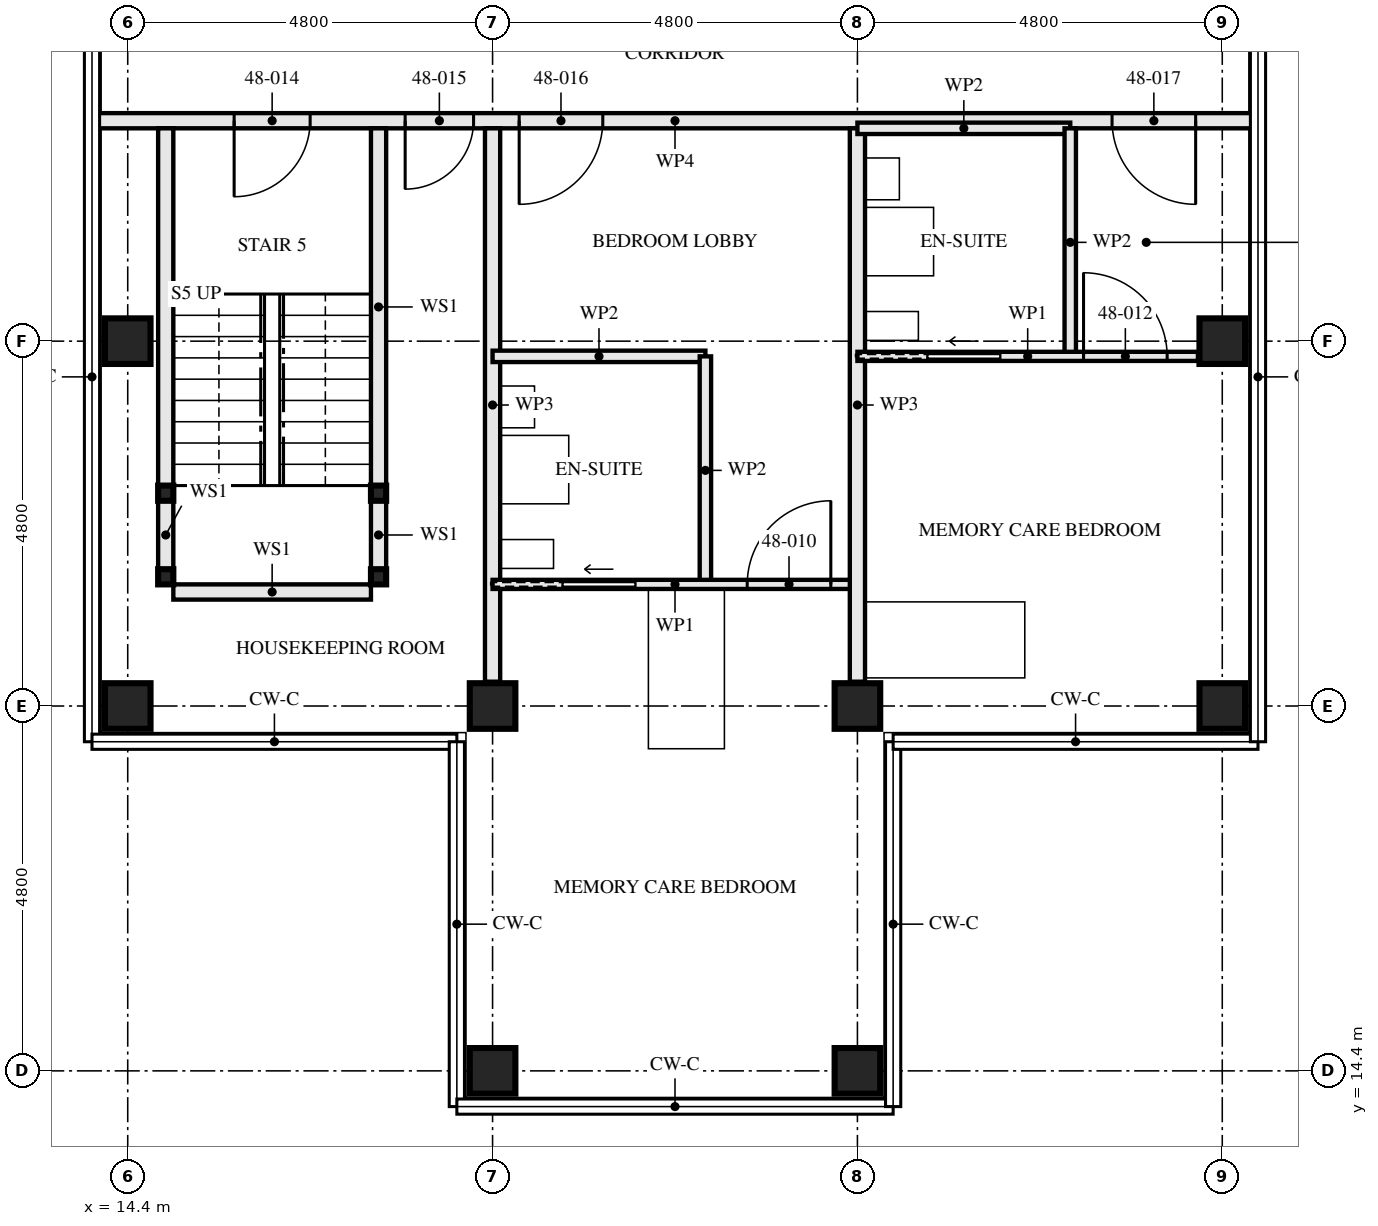
"""IFC4 building model, lengths in metres.
Left out: names, types, materials, properties, quantities, classifications, styles, units other than length and angle.
Written with IfcOpenShell. Run it as: python <this file> out.ifc"""

import sys

from ifc_helpers import new_model, si_unit, direction, frame, frame_2d, origin, origin_2d, place, context, subcontext, project, spatial, rectangle, hollow_rectangle, extrude, element, fill, save


model = new_model("IFC4")
c1 = context("Model", 3, precision=1e-05, world=origin(), true_north=direction((0.0, 1.0)))
c2 = subcontext(c1, "Body", "Model", "MODEL_VIEW")
j1 = project(units=[si_unit("LENGTHUNIT", "METRE"), si_unit("PLANEANGLEUNIT", "RADIAN")], contexts=[c1])
p1 = place(None, origin())
s1 = spatial("IfcSite", under=j1, at=p1, CompositionType="ELEMENT")
p2 = place(p1, origin())
s2 = spatial("IfcBuilding", under=s1, at=p2, CompositionType="ELEMENT")
p3 = place(p2, frame((0.0, 0.0, 176.0)))
s3 = spatial("IfcBuildingStorey", under=s2, at=p3, CompositionType="ELEMENT", Elevation=176.0)
for number, where, z_axis, x_axis in (
    (1, (14.4, 19.2, 0.0), (0.0, 0.0, 1.0), (0.0, 1.0, 0.0)),
    (2, (14.4, 24.0, 0.0), (0.0, 0.0, 1.0), (1.0, 0.0, 0.0)),
    (3, (19.2, 14.4, 0.0), (0.0, 0.0, 1.0), (0.0, 1.0, 0.0)),
    (4, (19.2, 19.2, 0.0), (0.0, 0.0, 1.0), (0.0, 1.0, 0.0)),
    (5, (24.0, 14.4, 0.0), (0.0, 0.0, 1.0), (0.0, 1.0, 0.0)),
    (6, (24.0, 19.2, 0.0), (0.0, 0.0, 1.0), (0.0, 1.0, 0.0)),
    (7, (28.8, 19.2, 0.0), (0.0, 0.0, 1.0), (0.0, 1.0, 0.0)),
    (8, (28.8, 24.0, 0.0), (0.0, 0.0, 1.0), (1.0, 0.0, 0.0)),
):
    element("IfcColumn", number, at=place(p3, frame(where, z_axis=z_axis, x_axis=x_axis)), inside=s3, PredefinedType="COLUMN", context=c2, shape_type="SweptSolid", body=[
        extrude(hollow_rectangle(XDim=0.6, YDim=0.6, WallThickness=0.08, at=origin_2d()), origin(), (0.0, 0.0, 1.0), 3.5),
    ])
for number, where, z_axis, x_axis in (
    (9, (14.9, 20.9, 0.0), (0.0, 0.0, 1.0), (1.0, 0.0, 0.0)),
    (10, (17.7, 20.9, 0.0), (0.0, 0.0, 1.0), (1.0, 0.0, 0.0)),
    (11, (14.9, 22.0, 0.0), (0.0, 0.0, 1.0), (1.0, 0.0, 0.0)),
    (12, (17.7, 22.0, 0.0), (0.0, 0.0, 1.0), (1.0, 0.0, 0.0)),
):
    element("IfcColumn", number, at=place(p3, frame(where, z_axis=z_axis, x_axis=x_axis)), inside=s3, PredefinedType="COLUMN", context=c2, shape_type="SweptSolid", body=[
        extrude(hollow_rectangle(XDim=0.2, YDim=0.2, WallThickness=0.008, at=origin_2d()), origin(), (0.0, 0.0, 1.0), 3.33),
    ])
p4 = place(p3, frame((14.9, 21.0, 0.0), z_axis=(0.0, 0.0, 1.0), x_axis=(0.0, 1.0, 0.0)))
e13 = element("IfcWall", 13, at=p4, inside=s3, PredefinedType="SOLIDWALL", context=c2, shape_type="SweptSolid", body=[
    extrude(rectangle(XDim=0.9, YDim=0.2, at=frame_2d((0.45, 0.0))), origin(), (0.0, 0.0, 1.0), 2.99),
])
p5 = place(p3, frame((14.9, 22.1, 0.0), z_axis=(0.0, 0.0, 1.0), x_axis=(0.0, 1.0, 0.0)))
e14 = element("IfcWall", 14, at=p5, inside=s3, PredefinedType="SOLIDWALL", context=c2, shape_type="SweptSolid", body=[
    extrude(rectangle(XDim=4.7, YDim=0.2, at=frame_2d((2.35, 0.0))), origin(), (0.0, 0.0, 1.0), 2.99),
])
p6 = place(p3, frame((17.7, 21.0, 0.0), z_axis=(0.0, 0.0, 1.0), x_axis=(0.0, 1.0, 0.0)))
e15 = element("IfcWall", 15, at=p6, inside=s3, PredefinedType="SOLIDWALL", context=c2, shape_type="SweptSolid", body=[
    extrude(rectangle(XDim=0.9, YDim=0.2, at=frame_2d((0.45, 0.0))), origin(), (0.0, 0.0, 1.0), 2.99),
])
p7 = place(p3, frame((17.7, 22.1, 0.0), z_axis=(0.0, 0.0, 1.0), x_axis=(0.0, 1.0, 0.0)))
e16 = element("IfcWall", 16, at=p7, inside=s3, PredefinedType="SOLIDWALL", context=c2, shape_type="SweptSolid", body=[
    extrude(rectangle(XDim=4.7, YDim=0.2, at=frame_2d((2.35, 0.0))), origin(), (0.0, 0.0, 1.0), 2.99),
])
p8 = place(p3, frame((15.0, 20.7, 0.0), z_axis=(0.0, 0.0, 1.0), x_axis=(1.0, 0.0, 0.0)))
e17 = element("IfcWall", 17, at=p8, inside=s3, PredefinedType="SOLIDWALL", context=c2, shape_type="SweptSolid", body=[
    extrude(rectangle(XDim=2.6, YDim=0.2, at=frame_2d((1.3, 0.0))), origin(), (0.0, 0.0, 1.0), 3.33),
])
p9 = place(p3, frame((19.2, 19.52, 0.0), z_axis=(0.0, 0.0, 1.0), x_axis=(0.0, 1.0, 0.0)))
e18 = element("IfcWall", 18, at=p9, inside=s3, PredefinedType="PARTITIONING", context=c2, shape_type="SweptSolid", body=[
    extrude(rectangle(XDim=7.28, YDim=0.2, at=frame_2d((3.64, 0.0))), origin(), (0.0, 0.0, 1.0), 2.55),
])
p10 = place(p3, frame((22.0, 20.8, 0.0), z_axis=(0.0, 0.0, 1.0), x_axis=(0.0, 1.0, 0.0)))
e19 = element("IfcWall", 19, at=p10, inside=s3, PredefinedType="PARTITIONING", context=c2, shape_type="SweptSolid", body=[
    extrude(rectangle(XDim=3.0, YDim=0.15, at=frame_2d((1.5, 0.0))), origin(), (0.0, 0.0, 1.0), 3.33),
])
p11 = place(p3, frame((19.2, 23.8, 0.0), z_axis=(0.0, 0.0, 1.0), x_axis=(1.0, 0.0, 0.0)))
e20 = element("IfcWall", 20, at=p11, inside=s3, PredefinedType="PARTITIONING", context=c2, shape_type="SweptSolid", body=[
    extrude(rectangle(XDim=2.8, YDim=0.15, at=frame_2d((1.4, 0.0))), origin(), (0.0, 0.0, 1.0), 3.33),
])
p12 = place(p3, frame((19.2, 20.8, 0.0), z_axis=(0.0, 0.0, 1.0), x_axis=(1.0, 0.0, 0.0)))
e21 = element("IfcWall", 21, at=p12, inside=s3, PredefinedType="PARTITIONING", context=c2, shape_type="SweptSolid", body=[
    extrude(rectangle(XDim=4.8, YDim=0.12, at=frame_2d((2.4, 0.0))), origin(), (0.0, 0.0, 1.0), 3.33),
])
p13 = place(p12, frame((3.35, 0.0, 0.0)))
e22 = element("IfcOpeningElement", 22, at=p13, cuts=e21, PredefinedType="OPENING", context=c2, shape_type="SweptSolid", body=[
    extrude(rectangle(XDim=1.1, YDim=2.1, at=frame_2d((0.55, 1.05))), frame((0.0, 0.071, 0.0), z_axis=(0.0, -1.0, 0.0), x_axis=(1.0, 0.0, 0.0)), (0.0, 0.0, 1.0), 0.141),
])
p14 = place(p12, frame((0.925, 0.0, 0.0)))
e23 = element("IfcOpeningElement", 23, at=p14, cuts=e21, PredefinedType="OPENING", context=c2, shape_type="SweptSolid", body=[
    extrude(rectangle(XDim=0.95, YDim=2.1, at=frame_2d((0.475, 1.05))), frame((0.0, 0.071, 0.0), z_axis=(0.0, -1.0, 0.0), x_axis=(1.0, 0.0, 0.0)), (0.0, 0.0, 1.0), 0.141),
])
p15 = place(p3, frame((24.0, 19.52, 0.0), z_axis=(0.0, 0.0, 1.0), x_axis=(0.0, 1.0, 0.0)))
e24 = element("IfcWall", 24, at=p15, inside=s3, PredefinedType="PARTITIONING", context=c2, shape_type="SweptSolid", body=[
    extrude(rectangle(XDim=7.28, YDim=0.2, at=frame_2d((3.64, 0.0))), origin(), (0.0, 0.0, 1.0), 2.55),
])
p16 = place(p3, frame((26.8, 23.8, 0.0), z_axis=(0.0, 0.0, 1.0), x_axis=(0.0, 1.0, 0.0)))
e25 = element("IfcWall", 25, at=p16, inside=s3, PredefinedType="PARTITIONING", context=c2, shape_type="SweptSolid", body=[
    extrude(rectangle(XDim=3.0, YDim=0.15, at=frame_2d((1.5, 0.0))), origin(), (0.0, 0.0, 1.0), 2.55),
])
p17 = place(p3, frame((24.0, 26.8, 0.0), z_axis=(0.0, 0.0, 1.0), x_axis=(1.0, 0.0, 0.0)))
e26 = element("IfcWall", 26, at=p17, inside=s3, PredefinedType="PARTITIONING", context=c2, shape_type="SweptSolid", body=[
    extrude(rectangle(XDim=2.8, YDim=0.15, at=frame_2d((1.4, 0.0))), origin(), (0.0, 0.0, 1.0), 3.33),
])
p18 = place(p3, frame((24.0, 23.8, 0.0), z_axis=(0.0, 0.0, 1.0), x_axis=(1.0, 0.0, 0.0)))
e27 = element("IfcWall", 27, at=p18, inside=s3, PredefinedType="PARTITIONING", context=c2, shape_type="SweptSolid", body=[
    extrude(rectangle(XDim=4.48, YDim=0.12, at=frame_2d((2.24, 0.0))), origin(), (0.0, 0.0, 1.0), 3.33),
])
p19 = place(p18, frame((2.975, 0.0, 0.0)))
e28 = element("IfcOpeningElement", 28, at=p19, cuts=e27, PredefinedType="OPENING", context=c2, shape_type="SweptSolid", body=[
    extrude(rectangle(XDim=1.1, YDim=2.1, at=frame_2d((0.55, 1.05))), frame((0.0, 0.071, 0.0), z_axis=(0.0, -1.0, 0.0), x_axis=(1.0, 0.0, 0.0)), (0.0, 0.0, 1.0), 0.141),
])
p20 = place(p18, frame((0.925, 0.0, 0.0)))
e29 = element("IfcOpeningElement", 29, at=p20, cuts=e27, PredefinedType="OPENING", context=c2, shape_type="SweptSolid", body=[
    extrude(rectangle(XDim=0.95, YDim=2.1, at=frame_2d((0.475, 1.05))), frame((0.0, 0.071, 0.0), z_axis=(0.0, -1.0, 0.0), x_axis=(1.0, 0.0, 0.0)), (0.0, 0.0, 1.0), 0.141),
])
p21 = place(p3, frame((13.95, 26.9, 0.0), z_axis=(0.0, 0.0, 1.0), x_axis=(1.0, 0.0, 0.0)))
e30 = element("IfcWall", 30, at=p21, inside=s3, PredefinedType="PARTITIONING", context=c2, shape_type="SweptSolid", body=[
    extrude(rectangle(XDim=15.3, YDim=0.2, at=frame_2d((7.65, 0.0))), origin(), (0.0, 0.0, 1.0), 2.32),
])
p22 = place(p21, frame((1.85, 0.0, 0.0)))
e31 = element("IfcOpeningElement", 31, at=p22, cuts=e30, PredefinedType="OPENING", context=c2, shape_type="SweptSolid", body=[
    extrude(rectangle(XDim=1.0, YDim=2.1, at=frame_2d((0.5, 1.05))), frame((0.0, 0.111, 0.0), z_axis=(0.0, -1.0, 0.0), x_axis=(1.0, 0.0, 0.0)), (0.0, 0.0, 1.0), 0.221),
])
p23 = place(p21, frame((4.1, 0.0, 0.0)))
e32 = element("IfcOpeningElement", 32, at=p23, cuts=e30, PredefinedType="OPENING", context=c2, shape_type="SweptSolid", body=[
    extrude(rectangle(XDim=0.9, YDim=2.1, at=frame_2d((0.45, 1.05))), frame((0.0, 0.111, 0.0), z_axis=(0.0, -1.0, 0.0), x_axis=(1.0, 0.0, 0.0)), (0.0, 0.0, 1.0), 0.221),
])
p24 = place(p21, frame((5.6, 0.0, 0.0)))
e33 = element("IfcOpeningElement", 33, at=p24, cuts=e30, PredefinedType="OPENING", context=c2, shape_type="SweptSolid", body=[
    extrude(rectangle(XDim=1.1, YDim=2.1, at=frame_2d((0.55, 1.05))), frame((0.0, 0.111, 0.0), z_axis=(0.0, -1.0, 0.0), x_axis=(1.0, 0.0, 0.0)), (0.0, 0.0, 1.0), 0.221),
])
p25 = place(p21, frame((13.4, 0.0, 0.0)))
e34 = element("IfcOpeningElement", 34, at=p25, cuts=e30, PredefinedType="OPENING", context=c2, shape_type="SweptSolid", body=[
    extrude(rectangle(XDim=1.1, YDim=2.1, at=frame_2d((0.55, 1.05))), frame((0.0, 0.111, 0.0), z_axis=(0.0, -1.0, 0.0), x_axis=(1.0, 0.0, 0.0)), (0.0, 0.0, 1.0), 0.221),
])
p26 = place(p13, origin())
e35 = element("IfcDoor", 35, at=p26, inside=s3, OperationType="SINGLE_SWING_LEFT", PredefinedType="DOOR", context=c2, shape_type="SweptSolid", body=[
    extrude(rectangle(XDim=1.1, YDim=2.1, at=frame_2d((0.55, 1.05))), frame((0.0, 0.022, 0.0), z_axis=(0.0, -1.0, 0.0), x_axis=(1.0, 0.0, 0.0)), (0.0, 0.0, 1.0), 0.044),
])
fill(e22, e35)
p27 = place(p14, origin())
e36 = element("IfcDoor", 36, at=p27, inside=s3, OperationType="SLIDING_TO_RIGHT", PredefinedType="DOOR", context=c2, shape_type="SweptSolid", body=[
    extrude(rectangle(XDim=0.95, YDim=2.1, at=frame_2d((0.475, 1.05))), frame((0.0, 0.022, 0.0), z_axis=(0.0, -1.0, 0.0), x_axis=(1.0, 0.0, 0.0)), (0.0, 0.0, 1.0), 0.044),
])
fill(e23, e36)
p28 = place(p19, origin())
e37 = element("IfcDoor", 37, at=p28, inside=s3, OperationType="SINGLE_SWING_RIGHT", PredefinedType="DOOR", context=c2, shape_type="SweptSolid", body=[
    extrude(rectangle(XDim=1.1, YDim=2.1, at=frame_2d((0.55, 1.05))), frame((0.0, 0.022, 0.0), z_axis=(0.0, -1.0, 0.0), x_axis=(1.0, 0.0, 0.0)), (0.0, 0.0, 1.0), 0.044),
])
fill(e28, e37)
p29 = place(p20, origin())
e38 = element("IfcDoor", 38, at=p29, inside=s3, OperationType="SLIDING_TO_RIGHT", PredefinedType="DOOR", context=c2, shape_type="SweptSolid", body=[
    extrude(rectangle(XDim=0.95, YDim=2.1, at=frame_2d((0.475, 1.05))), frame((0.0, 0.022, 0.0), z_axis=(0.0, -1.0, 0.0), x_axis=(1.0, 0.0, 0.0)), (0.0, 0.0, 1.0), 0.044),
])
fill(e29, e38)
p30 = place(p22, frame((1.0, 0.0, 0.0), z_axis=(0.0, 0.0, 1.0), x_axis=(-1.0, 0.0, 0.0)))
e39 = element("IfcDoor", 39, at=p30, inside=s3, OperationType="SINGLE_SWING_LEFT", PredefinedType="DOOR", context=c2, shape_type="SweptSolid", body=[
    extrude(rectangle(XDim=1.0, YDim=2.1, at=frame_2d((0.5, 1.05))), frame((0.0, 0.032, 0.0), z_axis=(0.0, -1.0, 0.0), x_axis=(1.0, 0.0, 0.0)), (0.0, 0.0, 1.0), 0.064),
])
fill(e31, e39)
p31 = place(p23, frame((0.9, 0.0, 0.0), z_axis=(0.0, 0.0, 1.0), x_axis=(-1.0, 0.0, 0.0)))
e40 = element("IfcDoor", 40, at=p31, inside=s3, OperationType="SINGLE_SWING_LEFT", PredefinedType="DOOR", context=c2, shape_type="SweptSolid", body=[
    extrude(rectangle(XDim=0.9, YDim=2.1, at=frame_2d((0.45, 1.05))), frame((0.0, 0.027, 0.0), z_axis=(0.0, -1.0, 0.0), x_axis=(1.0, 0.0, 0.0)), (0.0, 0.0, 1.0), 0.054),
])
fill(e32, e40)
p32 = place(p24, frame((1.1, 0.0, 0.0), z_axis=(0.0, 0.0, 1.0), x_axis=(-1.0, 0.0, 0.0)))
e41 = element("IfcDoor", 41, at=p32, inside=s3, OperationType="SINGLE_SWING_LEFT", PredefinedType="DOOR", context=c2, shape_type="SweptSolid", body=[
    extrude(rectangle(XDim=1.1, YDim=2.1, at=frame_2d((0.55, 1.05))), frame((0.0, 0.027, 0.0), z_axis=(0.0, -1.0, 0.0), x_axis=(1.0, 0.0, 0.0)), (0.0, 0.0, 1.0), 0.054),
])
fill(e33, e41)
p33 = place(p25, frame((1.1, 0.0, 0.0), z_axis=(0.0, 0.0, 1.0), x_axis=(-1.0, 0.0, 0.0)))
e42 = element("IfcDoor", 42, at=p33, inside=s3, OperationType="SINGLE_SWING_RIGHT", PredefinedType="DOOR", context=c2, shape_type="SweptSolid", body=[
    extrude(rectangle(XDim=1.1, YDim=2.1, at=frame_2d((0.55, 1.05))), frame((0.0, 0.027, 0.0), z_axis=(0.0, -1.0, 0.0), x_axis=(1.0, 0.0, 0.0)), (0.0, 0.0, 1.0), 0.054),
])
fill(e34, e42)
save(model, sys.argv[1])
